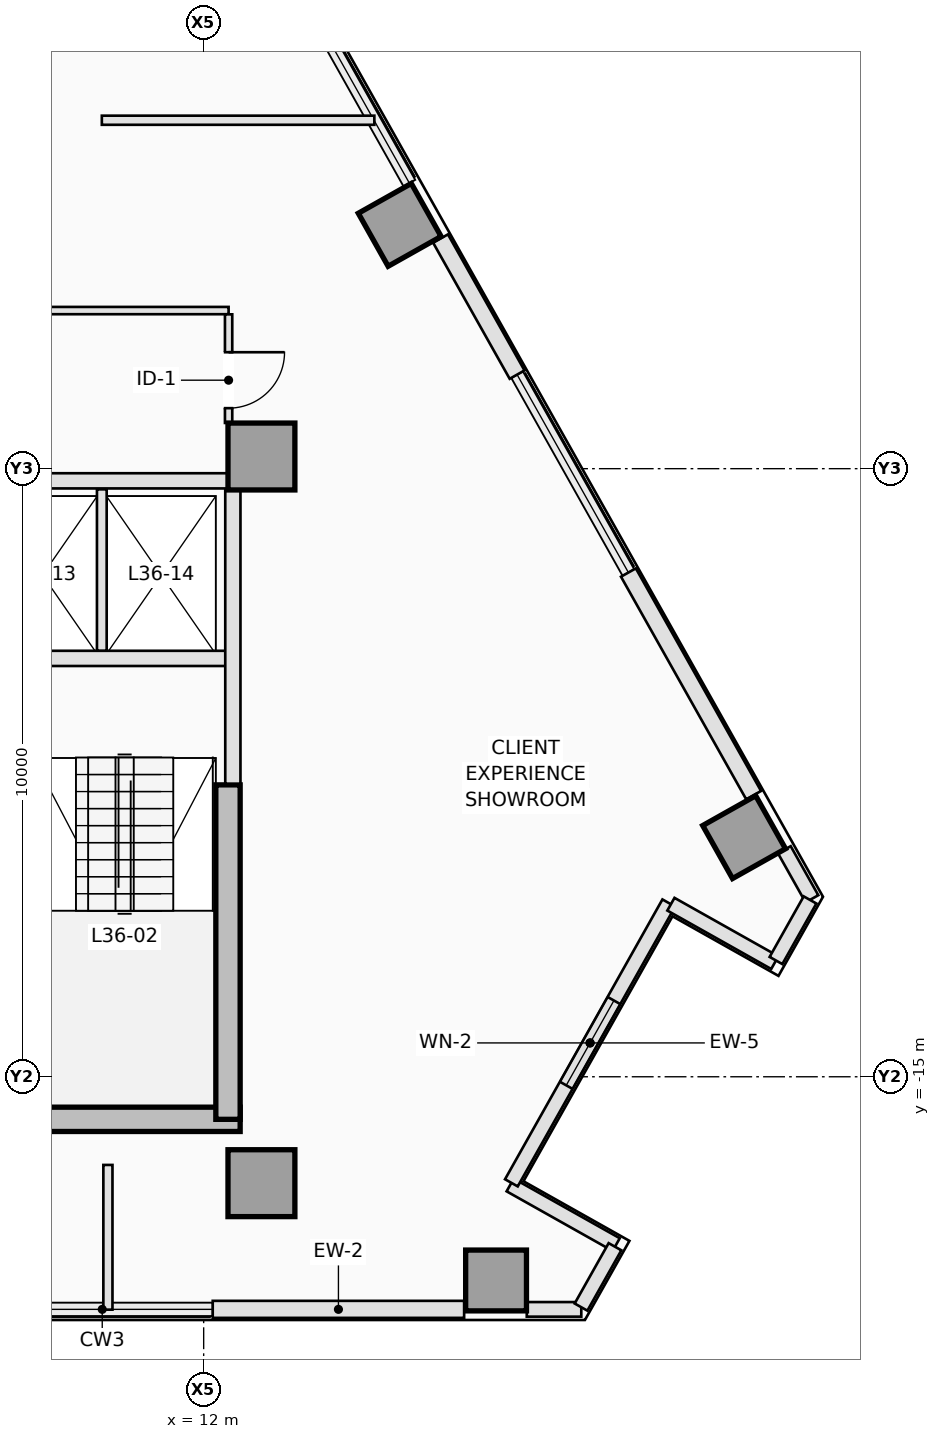
"""IFC4 building model, lengths in metres.
Left out: names, types, materials, properties, quantities, classifications, styles, units other than length and angle.
Written with IfcOpenShell. Run it as: python <this file> out.ifc"""

import sys

from ifc_helpers import new_model, si_unit, direction, frame, frame_2d, origin, origin_2d, place, context, subcontext, project, spatial, rectangle, extrude, element, fill, save


model = new_model("IFC4")
c1 = context("Model", 3, precision=1e-05, world=origin(), true_north=direction((0.0, 1.0)))
c2 = subcontext(c1, "Body", "Model", "MODEL_VIEW")
j1 = project(units=[si_unit("LENGTHUNIT", "METRE"), si_unit("PLANEANGLEUNIT", "RADIAN")], contexts=[c1])
p1 = place(None, origin())
s1 = spatial("IfcSite", under=j1, at=p1, CompositionType="ELEMENT")
p2 = place(p1, origin())
s2 = spatial("IfcBuilding", under=s1, at=p2, CompositionType="ELEMENT")
p3 = place(p2, frame((0.0, 0.0, 133.5)))
s3 = spatial("IfcBuildingStorey", under=s2, at=p3, CompositionType="ELEMENT", Elevation=133.5)
p4 = place(p3, frame((8.8, -15.7, 0.0), z_axis=(0.0, 0.0, 1.0), x_axis=(1.0, 0.0, 0.0)))
e1 = element("IfcWall", 1, at=p4, inside=s3, PredefinedType="SHEAR", context=c2, shape_type="SweptSolid", body=[
    extrude(rectangle(XDim=3.8, YDim=0.4, at=frame_2d((1.9, 0.0))), origin(), (0.0, 0.0, 1.0), 3.5),
])
p5 = place(p3, frame((12.4, -15.7, 0.0), z_axis=(0.0, 0.0, 1.0), x_axis=(0.0, 1.0, 0.0)))
e2 = element("IfcWall", 2, at=p5, inside=s3, PredefinedType="SHEAR", context=c2, shape_type="SweptSolid", body=[
    extrude(rectangle(XDim=5.5, YDim=0.4, at=frame_2d((2.75, 0.0))), origin(), (0.0, 0.0, 1.0), 3.5),
])
for number, where, z_axis, x_axis in (
    (3, (12.95, -16.75, 0.0), (0.0, 0.0, 1.0), (1.0, 0.0, 0.0)),
    (4, (12.95, -4.8, 0.0), (0.0, 0.0, 1.0), (1.0, 0.0, 0.0)),
):
    element("IfcColumn", number, at=place(p3, frame(where, z_axis=z_axis, x_axis=x_axis)), inside=s3, PredefinedType="COLUMN", context=c2, shape_type="SweptSolid", body=[
        extrude(rectangle(XDim=1.1, YDim=1.1, at=origin_2d()), origin(), (0.0, 0.0, 1.0), 3.5),
    ])
for number, where, z_axis, x_axis in (
    (5, (16.808, -18.35, 0.0), (0.0, 0.0, 1.0), (0.0, 1.0, 0.0)),
    (6, (20.888, -11.06, 0.0), (0.0, 0.0, 1.0), (0.872, 0.49, 0.0)),
    (7, (15.224, -0.991, 0.0), (0.0, 0.0, 1.0), (0.872, 0.49, 0.0)),
):
    element("IfcColumn", number, at=place(p3, frame(where, z_axis=z_axis, x_axis=x_axis)), inside=s3, PredefinedType="COLUMN", context=c2, shape_type="SweptSolid", body=[
        extrude(rectangle(XDim=1.0, YDim=1.0, at=origin_2d()), origin(), (0.0, 0.0, 1.0), 3.5),
    ])
p6 = place(p3, frame((18.21, -18.825, 0.0), z_axis=(0.0, 0.0, 1.0), x_axis=(-1.0, 0.0, 0.0)))
e8 = element("IfcWall", 8, at=p6, inside=s3, PredefinedType="STANDARD", context=c2, shape_type="SweptSolid", body=[
    extrude(rectangle(XDim=0.896, YDim=0.24, at=frame_2d((0.448, 0.0))), origin(), (0.0, 0.0, 1.0), 3.25),
])
p7 = place(p3, frame((16.283, -18.825, 0.0), z_axis=(0.0, 0.0, 1.0), x_axis=(-1.0, 0.0, 0.0)))
e9 = element("IfcWall", 9, at=p7, inside=s3, PredefinedType="STANDARD", context=c2, shape_type="SweptSolid", body=[
    extrude(rectangle(XDim=4.135, YDim=0.28, at=frame_2d((2.067, 0.0))), origin(), (0.0, 0.0, 1.0), 3.25),
])
p8 = place(p3, frame((21.549, -11.267, 0.0), z_axis=(0.0, 0.0, 1.0), x_axis=(0.490248718924, -0.871582579905, 0.0)))
e10 = element("IfcWall", 10, at=p8, inside=s3, PredefinedType="STANDARD", context=c2, shape_type="SweptSolid", body=[
    extrude(rectangle(XDim=0.926, YDim=0.24, at=frame_2d((0.463, 0.0))), origin(), (0.0, 0.0, 1.0), 3.25),
])
p9 = place(p3, frame((15.896, -1.215, 0.0), z_axis=(0.0, 0.0, 1.0), x_axis=(0.490229640206, -0.871593311048, 0.0)))
e11 = element("IfcWall", 11, at=p9, inside=s3, PredefinedType="STANDARD", context=c2, shape_type="SweptSolid", body=[
    extrude(rectangle(XDim=2.568, YDim=0.28, at=frame_2d((1.284, 0.0))), origin(), (0.0, 0.0, 1.0), 3.25),
])
p10 = place(p3, frame((18.985, -6.708, 0.0), z_axis=(0.0, 0.0, 1.0), x_axis=(0.490230882965, -0.871592612054, 0.0)))
e12 = element("IfcWall", 12, at=p10, inside=s3, PredefinedType="STANDARD", context=c2, shape_type="SweptSolid", body=[
    extrude(rectangle(XDim=4.2, YDim=0.28, at=frame_2d((2.1, 0.0))), origin(), (0.0, 0.0, 1.0), 3.25),
])
p11 = place(p3, frame((18.784, -17.76, 0.0), z_axis=(0.0, 0.0, 1.0), x_axis=(-0.871536415941, 0.49033078191, 0.0)))
e13 = element("IfcWall", 13, at=p11, inside=s3, PredefinedType="STANDARD", context=c2, shape_type="SweptSolid", body=[
    extrude(rectangle(XDim=2.0, YDim=0.24, at=frame_2d((1.0, 0.0))), origin(), (0.0, 0.0, 1.0), 3.25),
])
p12 = place(p3, frame((17.06, -16.744, 0.0), z_axis=(0.0, 0.0, 1.0), x_axis=(0.490276606961, 0.871566892824, 0.0)))
e14 = element("IfcWall", 14, at=p12, inside=s3, PredefinedType="STANDARD", context=c2, shape_type="SweptSolid", body=[
    extrude(rectangle(XDim=5.28, YDim=0.24, at=frame_2d((2.64, 0.0))), origin(), (0.0, 0.0, 1.0), 3.25),
])
p13 = place(p12, frame((1.84, 0.0, 0.9)))
e15 = element("IfcOpeningElement", 15, at=p13, cuts=e14, PredefinedType="OPENING", context=c2, shape_type="SweptSolid", body=[
    extrude(rectangle(XDim=1.6, YDim=2.1, at=frame_2d((0.8, 1.05))), frame((0.0, 0.13, 0.0), z_axis=(0.0, -1.0, 0.0), x_axis=(1.0, 0.0, 0.0)), (0.0, 0.0, 1.0), 0.26),
])
p14 = place(p3, frame((19.684, -12.162, 0.0), z_axis=(0.0, 0.0, 1.0), x_axis=(0.871512328312, -0.490373593906, 0.0)))
e16 = element("IfcWall", 16, at=p14, inside=s3, PredefinedType="STANDARD", context=c2, shape_type="SweptSolid", body=[
    extrude(rectangle(XDim=1.96, YDim=0.24, at=frame_2d((0.98, 0.0))), origin(), (0.0, 0.0, 1.0), 3.25),
])
p15 = place(p3, frame((21.412, -13.088, 0.0), z_axis=(0.0, 0.0, 1.0), x_axis=(0.4900989379, 0.871666811958, 0.0)))
e17 = element("IfcWall", 17, at=p15, inside=s3, PredefinedType="STANDARD", context=c2, shape_type="SweptSolid", body=[
    extrude(rectangle(XDim=1.143, YDim=0.24, at=frame_2d((0.571, 0.0))), origin(), (0.0, 0.0, 1.0), 3.25),
])
p16 = place(p3, frame((18.206, -18.788, 0.0), z_axis=(0.0, 0.0, 1.0), x_axis=(0.490403700594, 0.871495387506, 0.0)))
e18 = element("IfcWall", 18, at=p16, inside=s3, PredefinedType="STANDARD", context=c2, shape_type="SweptSolid", body=[
    extrude(rectangle(XDim=1.139, YDim=0.24, at=frame_2d((0.57, 0.0))), origin(), (0.0, 0.0, 1.0), 3.25),
])
p17 = place(p3, frame((9.16, -8.12, 0.0), z_axis=(0.0, 0.0, 1.0), x_axis=(1.0, 0.0, 0.0)))
e19 = element("IfcWall", 19, at=p17, inside=s3, PredefinedType="PARTITIONING", context=c2, shape_type="SweptSolid", body=[
    extrude(rectangle(XDim=3.22, YDim=0.25, at=frame_2d((1.61, 0.0))), origin(), (0.0, 0.0, 1.0), 3.25),
])
p18 = place(p3, frame((12.48, -10.18, 0.0), z_axis=(0.0, 0.0, 1.0), x_axis=(0.0, 1.0, 0.0)))
e20 = element("IfcWall", 20, at=p18, inside=s3, PredefinedType="PARTITIONING", context=c2, shape_type="SweptSolid", body=[
    extrude(rectangle(XDim=4.828, YDim=0.25, at=frame_2d((2.414, 0.0))), origin(), (0.0, 0.0, 1.0), 3.25),
])
p19 = place(p3, frame((4.302, -5.2, 0.0), z_axis=(0.0, 0.0, 1.0), x_axis=(1.0, 0.0, 0.0)))
e21 = element("IfcWall", 21, at=p19, inside=s3, PredefinedType="PARTITIONING", context=c2, shape_type="SweptSolid", body=[
    extrude(rectangle(XDim=8.096, YDim=0.25, at=frame_2d((4.048, 0.0))), origin(), (0.0, 0.0, 1.0), 3.25),
])
p20 = place(p3, frame((10.325, -7.993, 0.0), z_axis=(0.0, 0.0, 1.0), x_axis=(0.0, 1.0, 0.0)))
e22 = element("IfcWall", 22, at=p20, inside=s3, PredefinedType="PARTITIONING", context=c2, shape_type="SweptSolid", body=[
    extrude(rectangle(XDim=2.653, YDim=0.16, at=frame_2d((1.326, 0.0))), origin(), (0.0, 0.0, 1.0), 3.25),
])
p21 = place(p3, frame((1.532, -2.4, 0.0), z_axis=(0.0, 0.0, 1.0), x_axis=(1.0, 0.0, 0.0)))
e23 = element("IfcWall", 23, at=p21, inside=s3, PredefinedType="PARTITIONING", context=c2, shape_type="SweptSolid", body=[
    extrude(rectangle(XDim=10.878, YDim=0.12, at=frame_2d((5.439, 0.0))), origin(), (0.0, 0.0, 1.0), 2.891),
])
p22 = place(p21, frame((3.252, 0.0, 0.0)))
e24 = element("IfcOpeningElement", 24, at=p22, cuts=e23, PredefinedType="OPENING", context=c2, shape_type="SweptSolid", body=[
    extrude(rectangle(XDim=0.92, YDim=2.12, at=frame_2d((0.46, 1.06))), frame((0.0, 0.07, 0.0), z_axis=(0.0, -1.0, 0.0), x_axis=(1.0, 0.0, 0.0)), (0.0, 0.0, 1.0), 0.14),
])
p23 = place(p3, frame((12.41, -2.462, 0.0), z_axis=(0.0, 0.0, 1.0), x_axis=(0.0, -1.0, 0.0)))
e25 = element("IfcWall", 25, at=p23, inside=s3, PredefinedType="PARTITIONING", context=c2, shape_type="SweptSolid", body=[
    extrude(rectangle(XDim=1.786, YDim=0.12, at=frame_2d((0.893, 0.0))), origin(), (0.0, 0.0, 1.0), 3.25),
])
p24 = place(p23, frame((0.623, 0.0, 0.0)))
e26 = element("IfcOpeningElement", 26, at=p24, cuts=e25, PredefinedType="OPENING", context=c2, shape_type="SweptSolid", body=[
    extrude(rectangle(XDim=0.92, YDim=2.12, at=frame_2d((0.46, 1.06))), frame((0.0, 0.07, 0.0), z_axis=(0.0, -1.0, 0.0), x_axis=(1.0, 0.0, 0.0)), (0.0, 0.0, 1.0), 0.14),
])
p25 = place(p3, frame((14.807, 0.73, 0.0), z_axis=(0.0, 0.0, 1.0), x_axis=(-1.0, 0.0, 0.0)))
e27 = element("IfcWall", 27, at=p25, inside=s3, PredefinedType="PARTITIONING", context=c2, shape_type="SweptSolid", body=[
    extrude(rectangle(XDim=4.482, YDim=0.15, at=frame_2d((2.241, 0.0))), origin(), (0.0, 0.0, 1.0), 3.25),
])
p26 = place(p3, frame((10.425, -18.83, 0.0), z_axis=(0.0, 0.0, 1.0), x_axis=(0.0, 1.0, 0.0)))
e28 = element("IfcWall", 28, at=p26, inside=s3, PredefinedType="PARTITIONING", context=c2, shape_type="SweptSolid", body=[
    extrude(rectangle(XDim=2.38, YDim=0.15, at=frame_2d((1.19, 0.0))), origin(), (0.0, 0.0, 1.0), 3.25),
])
p27 = place(p13, origin())
e29 = element("IfcWindow", 29, at=p27, inside=s3, PartitioningType="SINGLE_PANEL", PredefinedType="WINDOW", context=c2, shape_type="SweptSolid", body=[
    extrude(rectangle(XDim=1.6, YDim=2.1, at=frame_2d((0.8, 1.05))), frame((0.0, 0.03, 0.0), z_axis=(0.0, -1.0, 0.0), x_axis=(1.0, 0.0, 0.0)), (0.0, 0.0, 1.0), 0.06),
])
fill(e15, e29)
p28 = place(p24, origin())
e30 = element("IfcDoor", 30, at=p28, inside=s3, OperationType="SINGLE_SWING_LEFT", PredefinedType="DOOR", context=c2, shape_type="SweptSolid", body=[
    extrude(rectangle(XDim=0.92, YDim=2.12, at=frame_2d((0.46, 1.06))), frame((0.0, 0.025, 0.0), z_axis=(0.0, -1.0, 0.0), x_axis=(1.0, 0.0, 0.0)), (0.0, 0.0, 1.0), 0.05),
])
fill(e26, e30)
save(model, sys.argv[1])
